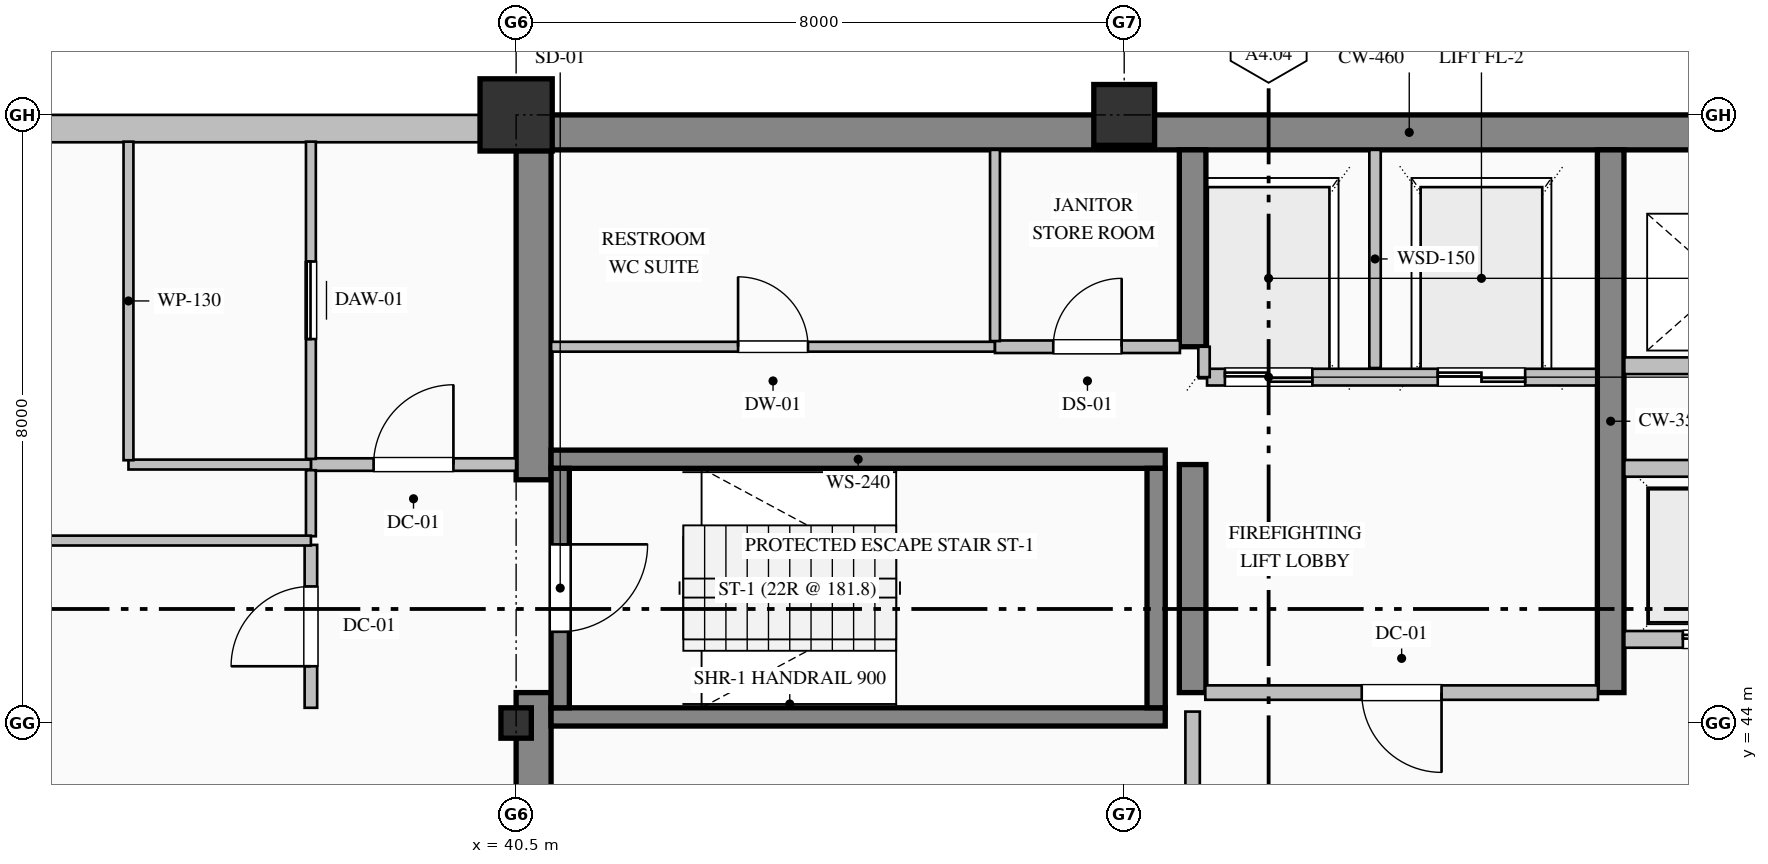
"""IFC4 building model, lengths in metres.
Left out: names, types, materials, properties, quantities, classifications, styles, units other than length and angle.
Written with IfcOpenShell. Run it as: python <this file> out.ifc"""

import sys

from ifc_helpers import new_model, si_unit, direction, frame, frame_2d, origin, origin_2d, place, context, subcontext, project, spatial, rectangle, hollow_rectangle, i_section, extrude, element, fill, save


model = new_model("IFC4")
c1 = context("Model", 3, precision=1e-05, world=origin(), true_north=direction((0.0, 1.0)))
c2 = subcontext(c1, "Body", "Model", "MODEL_VIEW")
j1 = project(units=[si_unit("LENGTHUNIT", "METRE"), si_unit("PLANEANGLEUNIT", "RADIAN")], contexts=[c1])
p1 = place(None, origin())
s1 = spatial("IfcSite", under=j1, at=p1, CompositionType="ELEMENT")
p2 = place(p1, origin())
s2 = spatial("IfcBuilding", under=s1, at=p2, CompositionType="ELEMENT")
p3 = place(p2, frame((0.0, 0.0, 225.8)))
s3 = spatial("IfcBuildingStorey", under=s2, at=p3, CompositionType="ELEMENT", Elevation=225.8)
p4 = place(p3, frame((40.5, 51.77, 0.0), z_axis=(0.0, 0.0, 1.0), x_axis=(1.0, 0.0, 0.0)))
e1 = element("IfcWall", 1, at=p4, inside=s3, PredefinedType="SHEAR", context=c2, shape_type="SweptSolid", body=[
    extrude(rectangle(XDim=23.5, YDim=0.46, at=frame_2d((11.75, 0.0))), origin(), (0.0, 0.0, 1.0), 3.775),
])
p5 = place(p3, frame((40.73, 36.46, 0.0), z_axis=(0.0, 0.0, 1.0), x_axis=(0.0, 1.0, 0.0)))
e2 = element("IfcWall", 2, at=p5, inside=s3, PredefinedType="SHEAR", context=c2, shape_type="SweptSolid", body=[
    extrude(rectangle(XDim=7.94, YDim=0.46, at=frame_2d((3.97, 0.0))), origin(), (0.0, 0.0, 1.0), 3.775),
])
p6 = place(p3, frame((40.73, 47.2, 0.0), z_axis=(0.0, 0.0, 1.0), x_axis=(0.0, 1.0, 0.0)))
e3 = element("IfcWall", 3, at=p6, inside=s3, PredefinedType="SHEAR", context=c2, shape_type="SweptSolid", body=[
    extrude(rectangle(XDim=4.34, YDim=0.46, at=frame_2d((2.17, 0.0))), origin(), (0.0, 0.0, 1.0), 3.775),
])
p7 = place(p3, frame((49.4, 44.4, 0.0), z_axis=(0.0, 0.0, 1.0), x_axis=(0.0, 1.0, 0.0)))
e4 = element("IfcWall", 4, at=p7, inside=s3, PredefinedType="SHEAR", context=c2, shape_type="SweptSolid", body=[
    extrude(rectangle(XDim=3.0, YDim=0.35, at=frame_2d((1.5, 0.0))), origin(), (0.0, 0.0, 1.0), 3.775),
])
p8 = place(p3, frame((49.4, 48.95, 0.0), z_axis=(0.0, 0.0, 1.0), x_axis=(0.0, 1.0, 0.0)))
e5 = element("IfcWall", 5, at=p8, inside=s3, PredefinedType="SHEAR", context=c2, shape_type="SweptSolid", body=[
    extrude(rectangle(XDim=2.59, YDim=0.35, at=frame_2d((1.295, 0.0))), origin(), (0.0, 0.0, 1.0), 3.775),
])
p9 = place(p3, frame((54.9, 44.4, 0.0), z_axis=(0.0, 0.0, 1.0), x_axis=(0.0, 1.0, 0.0)))
e6 = element("IfcWall", 6, at=p9, inside=s3, PredefinedType="SHEAR", context=c2, shape_type="SweptSolid", body=[
    extrude(rectangle(XDim=7.14, YDim=0.35, at=frame_2d((3.57, 0.0))), origin(), (0.0, 0.0, 1.0), 3.775),
])
p10 = place(p3, frame((40.5, 44.0, 0.0), z_axis=(0.0, 0.0, 1.0), x_axis=(1.0, 0.0, 0.0)))
e7 = element("IfcColumn", 7, at=p10, inside=s3, PredefinedType="COLUMN", context=c2, shape_type="SweptSolid", body=[
    extrude(i_section(OverallWidth=0.4, OverallDepth=0.4, WebThickness=0.013, FlangeThickness=0.021, FilletRadius=0.022, at=origin_2d()), origin(), (0.0, 0.0, 1.0), 4.0),
])
p11 = place(p3, frame((40.5, 52.0, 0.0), z_axis=(0.0, 0.0, 1.0), x_axis=(1.0, 0.0, 0.0)))
e8 = element("IfcColumn", 8, at=p11, inside=s3, PredefinedType="COLUMN", context=c2, shape_type="SweptSolid", body=[
    extrude(hollow_rectangle(XDim=0.95, YDim=0.95, WallThickness=0.036, at=origin_2d()), origin(), (0.0, 0.0, 1.0), 4.0),
])
p12 = place(p3, frame((48.5, 52.0, 0.0), z_axis=(0.0, 0.0, 1.0), x_axis=(1.0, 0.0, 0.0)))
e9 = element("IfcColumn", 9, at=p12, inside=s3, PredefinedType="COLUMN", context=c2, shape_type="SweptSolid", body=[
    extrude(hollow_rectangle(XDim=0.8, YDim=0.8, WallThickness=0.032, at=origin_2d()), origin(), (0.0, 0.0, 1.0), 4.0),
])
p13 = place(p3, frame((13.0, 51.82, 0.0), z_axis=(0.0, 0.0, 1.0), x_axis=(1.0, 0.0, 0.0)))
e10 = element("IfcWall", 10, at=p13, inside=s3, PredefinedType="SOLIDWALL", context=c2, shape_type="SweptSolid", body=[
    extrude(rectangle(XDim=27.52, YDim=0.36, at=frame_2d((13.76, 0.0))), origin(), (0.0, 0.0, 1.0), 3.325),
])
p14 = place(p13, frame((6.6, 0.0, 0.9)))
e11 = element("IfcOpeningElement", 11, at=p14, cuts=e10, PredefinedType="OPENING", context=c2, shape_type="SweptSolid", body=[
    extrude(rectangle(XDim=1.2, YDim=1.85, at=frame_2d((0.6, 0.925))), frame((0.0, 0.19, 0.0), z_axis=(0.0, -1.0, 0.0), x_axis=(1.0, 0.0, 0.0)), (0.0, 0.0, 1.0), 0.38),
])
p15 = place(p13, frame((17.4, 0.0, 0.9)))
e12 = element("IfcOpeningElement", 12, at=p15, cuts=e10, PredefinedType="OPENING", context=c2, shape_type="SweptSolid", body=[
    extrude(rectangle(XDim=1.2, YDim=1.85, at=frame_2d((0.6, 0.925))), frame((0.0, 0.19, 0.0), z_axis=(0.0, -1.0, 0.0), x_axis=(1.0, 0.0, 0.0)), (0.0, 0.0, 1.0), 0.38),
])
for number, where, z_axis, x_axis in (
    (13, (40.96, 47.47, 0.0), (0.0, 0.0, 1.0), (1.0, 0.0, 0.0)),
    (14, (49.04, 44.08, 0.0), (0.0, 0.0, 1.0), (-1.0, 0.0, 0.0)),
):
    element("IfcWall", number, at=place(p3, frame(where, z_axis=z_axis, x_axis=x_axis)), inside=s3, PredefinedType="SOLIDWALL", context=c2, shape_type="SweptSolid", body=[
        extrude(rectangle(XDim=8.08, YDim=0.24, at=frame_2d((4.04, 0.0))), origin(), (0.0, 0.0, 1.0), 4.0),
    ])
p16 = place(p3, frame((41.08, 47.35, 0.0), z_axis=(0.0, 0.0, 1.0), x_axis=(0.0, -1.0, 0.0)))
e15 = element("IfcWall", 15, at=p16, inside=s3, PredefinedType="SOLIDWALL", context=c2, shape_type="SweptSolid", body=[
    extrude(rectangle(XDim=3.15, YDim=0.24, at=frame_2d((1.575, 0.0))), origin(), (0.0, 0.0, 1.0), 4.0),
])
p17 = place(p16, frame((1.0, 0.0, 0.0)))
e16 = element("IfcOpeningElement", 16, at=p17, cuts=e15, PredefinedType="OPENING", context=c2, shape_type="SweptSolid", body=[
    extrude(rectangle(XDim=1.15, YDim=2.2, at=frame_2d((0.575, 1.1))), frame((0.0, 0.13, 0.0), z_axis=(0.0, -1.0, 0.0), x_axis=(1.0, 0.0, 0.0)), (0.0, 0.0, 1.0), 0.26),
])
p18 = place(p3, frame((48.92, 44.2, 0.0), z_axis=(0.0, 0.0, 1.0), x_axis=(0.0, 1.0, 0.0)))
e17 = element("IfcWall", 17, at=p18, inside=s3, PredefinedType="SOLIDWALL", context=c2, shape_type="SweptSolid", body=[
    extrude(rectangle(XDim=3.15, YDim=0.24, at=frame_2d((1.575, 0.0))), origin(), (0.0, 0.0, 1.0), 4.0),
])
p19 = place(p3, frame((54.71, 48.55, 0.0), z_axis=(0.0, 0.0, 1.0), x_axis=(-1.0, 0.0, 0.0)))
e18 = element("IfcWall", 18, at=p19, inside=s3, PredefinedType="PARTITIONING", context=c2, shape_type="SweptSolid", body=[
    extrude(rectangle(XDim=5.12, YDim=0.22, at=frame_2d((2.56, 0.0))), origin(), (0.0, 0.0, 1.0), 3.775),
])
p20 = place(p19, frame((3.735, 0.0, 0.0)))
e19 = element("IfcOpeningElement", 19, at=p20, cuts=e18, PredefinedType="OPENING", context=c2, shape_type="SweptSolid", body=[
    extrude(rectangle(XDim=1.15, YDim=2.2, at=frame_2d((0.575, 1.1))), frame((0.0, 0.12, 0.0), z_axis=(0.0, -1.0, 0.0), x_axis=(1.0, 0.0, 0.0)), (0.0, 0.0, 1.0), 0.24),
])
p21 = place(p19, frame((0.935, 0.0, 0.0)))
e20 = element("IfcOpeningElement", 20, at=p21, cuts=e18, PredefinedType="OPENING", context=c2, shape_type="SweptSolid", body=[
    extrude(rectangle(XDim=1.15, YDim=2.2, at=frame_2d((0.575, 1.1))), frame((0.0, 0.12, 0.0), z_axis=(0.0, -1.0, 0.0), x_axis=(1.0, 0.0, 0.0)), (0.0, 0.0, 1.0), 0.24),
])
p22 = place(p3, frame((51.8, 48.67, 0.0), z_axis=(0.0, 0.0, 1.0), x_axis=(0.0, 1.0, 0.0)))
e21 = element("IfcWall", 21, at=p22, inside=s3, PredefinedType="PARTITIONING", context=c2, shape_type="SweptSolid", body=[
    extrude(rectangle(XDim=2.87, YDim=0.15, at=frame_2d((1.435, 0.0))), origin(), (0.0, 0.0, 1.0), 3.775),
])
p23 = place(p3, frame((49.55, 48.55, 0.0), z_axis=(0.0, 0.0, 1.0), x_axis=(0.0, 1.0, 0.0)))
e22 = element("IfcWall", 22, at=p23, inside=s3, PredefinedType="PARTITIONING", context=c2, shape_type="SweptSolid", body=[
    extrude(rectangle(XDim=0.4, YDim=0.15, at=frame_2d((0.2, 0.0))), origin(), (0.0, 0.0, 1.0), 3.775),
])
p24 = place(p3, frame((63.32, 45.1, 0.0), z_axis=(0.0, 0.0, 1.0), x_axis=(-1.0, 0.0, 0.0)))
e23 = element("IfcWall", 23, at=p24, inside=s3, PredefinedType="PARTITIONING", context=c2, shape_type="SweptSolid", body=[
    extrude(rectangle(XDim=8.24, YDim=0.22, at=frame_2d((4.12, 0.0))), origin(), (0.0, 0.0, 1.0), 3.775),
])
p25 = place(p24, frame((6.37, 0.0, 0.0)))
e24 = element("IfcOpeningElement", 24, at=p25, cuts=e23, PredefinedType="OPENING", context=c2, shape_type="SweptSolid", body=[
    extrude(rectangle(XDim=1.1, YDim=2.2, at=frame_2d((0.55, 1.1))), frame((0.0, 0.12, 0.0), z_axis=(0.0, -1.0, 0.0), x_axis=(1.0, 0.0, 0.0)), (0.0, 0.0, 1.0), 0.24),
])
p26 = place(p24, frame((3.57, 0.0, 0.0)))
e25 = element("IfcOpeningElement", 25, at=p26, cuts=e23, PredefinedType="OPENING", context=c2, shape_type="SweptSolid", body=[
    extrude(rectangle(XDim=1.1, YDim=2.2, at=frame_2d((0.55, 1.1))), frame((0.0, 0.12, 0.0), z_axis=(0.0, -1.0, 0.0), x_axis=(1.0, 0.0, 0.0)), (0.0, 0.0, 1.0), 0.24),
])
p27 = place(p24, frame((0.77, 0.0, 0.0)))
e26 = element("IfcOpeningElement", 26, at=p27, cuts=e23, PredefinedType="OPENING", context=c2, shape_type="SweptSolid", body=[
    extrude(rectangle(XDim=1.1, YDim=2.2, at=frame_2d((0.55, 1.1))), frame((0.0, 0.12, 0.0), z_axis=(0.0, -1.0, 0.0), x_axis=(1.0, 0.0, 0.0)), (0.0, 0.0, 1.0), 0.24),
])
for number, where, z_axis, x_axis in (
    (27, (55.08, 47.35, 0.0), (0.0, 0.0, 1.0), (1.0, 0.0, 0.0)),
    (28, (63.32, 48.7, 0.0), (0.0, 0.0, 1.0), (-1.0, 0.0, 0.0)),
):
    element("IfcWall", number, at=place(p3, frame(where, z_axis=z_axis, x_axis=x_axis)), inside=s3, PredefinedType="PARTITIONING", context=c2, shape_type="SweptSolid", body=[
        extrude(rectangle(XDim=8.24, YDim=0.22, at=frame_2d((4.12, 0.0))), origin(), (0.0, 0.0, 1.0), 3.775),
    ])
p28 = place(p3, frame((37.8, 47.4, 0.0), z_axis=(0.0, 0.0, 1.0), x_axis=(1.0, 0.0, 0.0)))
e29 = element("IfcWall", 29, at=p28, inside=s3, PredefinedType="PARTITIONING", context=c2, shape_type="SweptSolid", body=[
    extrude(rectangle(XDim=2.7, YDim=0.165, at=frame_2d((1.35, 0.0))), origin(), (0.0, 0.0, 1.0), 3.775),
])
p29 = place(p28, frame((0.825, 0.0, 0.0)))
e30 = element("IfcOpeningElement", 30, at=p29, cuts=e29, PredefinedType="OPENING", context=c2, shape_type="SweptSolid", body=[
    extrude(rectangle(XDim=1.05, YDim=2.15, at=frame_2d((0.525, 1.075))), frame((0.0, 0.093, 0.0), z_axis=(0.0, -1.0, 0.0), x_axis=(1.0, 0.0, 0.0)), (0.0, 0.0, 1.0), 0.185),
])
p30 = place(p3, frame((37.8, 44.2, 0.0), z_axis=(0.0, 0.0, 1.0), x_axis=(0.0, 1.0, 0.0)))
e31 = element("IfcWall", 31, at=p30, inside=s3, PredefinedType="PARTITIONING", context=c2, shape_type="SweptSolid", body=[
    extrude(rectangle(XDim=2.143, YDim=0.165, at=frame_2d((1.072, 0.0))), origin(), (0.0, 0.0, 1.0), 3.775),
])
p31 = place(p30, frame((0.546, 0.0, 0.0)))
e32 = element("IfcOpeningElement", 32, at=p31, cuts=e31, PredefinedType="OPENING", context=c2, shape_type="SweptSolid", body=[
    extrude(rectangle(XDim=1.05, YDim=2.15, at=frame_2d((0.525, 1.075))), frame((0.0, 0.093, 0.0), z_axis=(0.0, -1.0, 0.0), x_axis=(1.0, 0.0, 0.0)), (0.0, 0.0, 1.0), 0.185),
])
p32 = place(p3, frame((37.8, 46.457, 0.0), z_axis=(0.0, 0.0, 1.0), x_axis=(0.0, 1.0, 0.0)))
e33 = element("IfcWall", 33, at=p32, inside=s3, PredefinedType="PARTITIONING", context=c2, shape_type="SweptSolid", body=[
    extrude(rectangle(XDim=0.868, YDim=0.13, at=frame_2d((0.434, 0.0))), origin(), (0.0, 0.0, 1.0), 3.775),
])
p33 = place(p3, frame((37.8, 47.475, 0.0), z_axis=(0.0, 0.0, 1.0), x_axis=(0.0, 1.0, 0.0)))
e34 = element("IfcWall", 34, at=p33, inside=s3, PredefinedType="PARTITIONING", context=c2, shape_type="SweptSolid", body=[
    extrude(rectangle(XDim=4.173, YDim=0.13, at=frame_2d((2.087, 0.0))), origin(), (0.0, 0.0, 1.0), 3.775),
])
p34 = place(p33, frame((1.577, 0.0, 0.0)))
e35 = element("IfcOpeningElement", 35, at=p34, cuts=e34, PredefinedType="OPENING", context=c2, shape_type="SweptSolid", body=[
    extrude(rectangle(XDim=1.02, YDim=2.15, at=frame_2d((0.51, 1.075))), frame((0.0, 0.075, 0.0), z_axis=(0.0, -1.0, 0.0), x_axis=(1.0, 0.0, 0.0)), (0.0, 0.0, 1.0), 0.15),
])
p35 = place(p3, frame((37.8, 47.4, 0.0), z_axis=(0.0, 0.0, 1.0), x_axis=(-1.0, 0.0, 0.0)))
e36 = element("IfcWall", 36, at=p35, inside=s3, PredefinedType="PARTITIONING", context=c2, shape_type="SweptSolid", body=[
    extrude(rectangle(XDim=2.4, YDim=0.13, at=frame_2d((1.2, 0.0))), origin(), (0.0, 0.0, 1.0), 3.775),
])
p36 = place(p3, frame((35.4, 47.457, 0.0), z_axis=(0.0, 0.0, 1.0), x_axis=(0.0, 1.0, 0.0)))
e37 = element("IfcWall", 37, at=p36, inside=s3, PredefinedType="PARTITIONING", context=c2, shape_type="SweptSolid", body=[
    extrude(rectangle(XDim=4.191, YDim=0.13, at=frame_2d((2.095, 0.0))), origin(), (0.0, 0.0, 1.0), 3.775),
])
p37 = place(p3, frame((40.96, 48.95, 0.0), z_axis=(0.0, 0.0, 1.0), x_axis=(1.0, 0.0, 0.0)))
e38 = element("IfcWall", 38, at=p37, inside=s3, PredefinedType="PARTITIONING", context=c2, shape_type="SweptSolid", body=[
    extrude(rectangle(XDim=5.84, YDim=0.13, at=frame_2d((2.92, 0.0))), origin(), (0.0, 0.0, 1.0), 3.775),
])
p38 = place(p37, frame((2.46, 0.0, 0.0)))
e39 = element("IfcOpeningElement", 39, at=p38, cuts=e38, PredefinedType="OPENING", context=c2, shape_type="SweptSolid", body=[
    extrude(rectangle(XDim=0.92, YDim=2.15, at=frame_2d((0.46, 1.075))), frame((0.0, 0.075, 0.0), z_axis=(0.0, -1.0, 0.0), x_axis=(1.0, 0.0, 0.0)), (0.0, 0.0, 1.0), 0.15),
])
p39 = place(p3, frame((46.8, 48.95, 0.0), z_axis=(0.0, 0.0, 1.0), x_axis=(1.0, 0.0, 0.0)))
e40 = element("IfcWall", 40, at=p39, inside=s3, PredefinedType="PARTITIONING", context=c2, shape_type="SweptSolid", body=[
    extrude(rectangle(XDim=2.433, YDim=0.165, at=frame_2d((1.216, 0.0))), origin(), (0.0, 0.0, 1.0), 3.775),
])
p40 = place(p39, frame((0.767, 0.0, 0.0)))
e41 = element("IfcOpeningElement", 41, at=p40, cuts=e40, PredefinedType="OPENING", context=c2, shape_type="SweptSolid", body=[
    extrude(rectangle(XDim=0.9, YDim=2.15, at=frame_2d((0.45, 1.075))), frame((0.0, 0.093, 0.0), z_axis=(0.0, -1.0, 0.0), x_axis=(1.0, 0.0, 0.0)), (0.0, 0.0, 1.0), 0.185),
])
p41 = place(p3, frame((54.733, 44.4, 0.0), z_axis=(0.0, 0.0, 1.0), x_axis=(-1.0, 0.0, 0.0)))
e42 = element("IfcWall", 42, at=p41, inside=s3, PredefinedType="PARTITIONING", context=c2, shape_type="SweptSolid", body=[
    extrude(rectangle(XDim=5.166, YDim=0.19, at=frame_2d((2.583, 0.0))), origin(), (0.0, 0.0, 1.0), 3.775),
])
p42 = place(p41, frame((2.058, 0.0, 0.0)))
e43 = element("IfcOpeningElement", 43, at=p42, cuts=e42, PredefinedType="OPENING", context=c2, shape_type="SweptSolid", body=[
    extrude(rectangle(XDim=1.05, YDim=2.15, at=frame_2d((0.525, 1.075))), frame((0.0, 0.105, 0.0), z_axis=(0.0, -1.0, 0.0), x_axis=(1.0, 0.0, 0.0)), (0.0, 0.0, 1.0), 0.21),
])
p43 = place(p3, frame((49.4, 40.487, 0.0), z_axis=(0.0, 0.0, 1.0), x_axis=(0.0, 1.0, 0.0)))
e44 = element("IfcWall", 44, at=p43, inside=s3, PredefinedType="PARTITIONING", context=c2, shape_type="SweptSolid", body=[
    extrude(rectangle(XDim=3.663, YDim=0.19, at=frame_2d((1.832, 0.0))), origin(), (0.0, 0.0, 1.0), 3.017),
])
p44 = place(p43, frame((1.132, 0.0, 0.0)))
e45 = element("IfcOpeningElement", 45, at=p44, cuts=e44, PredefinedType="OPENING", context=c2, shape_type="SweptSolid", body=[
    extrude(rectangle(XDim=1.4, YDim=2.25, at=frame_2d((0.7, 1.125))), frame((0.0, 0.105, 0.0), z_axis=(0.0, -1.0, 0.0), x_axis=(1.0, 0.0, 0.0)), (0.0, 0.0, 1.0), 0.21),
])
p45 = place(p3, frame((46.8, 51.54, 0.0), z_axis=(0.0, 0.0, 1.0), x_axis=(0.0, -1.0, 0.0)))
e46 = element("IfcWall", 46, at=p45, inside=s3, PredefinedType="PARTITIONING", context=c2, shape_type="SweptSolid", body=[
    extrude(rectangle(XDim=2.516, YDim=0.13, at=frame_2d((1.258, 0.0))), origin(), (0.0, 0.0, 1.0), 3.775),
])
p46 = place(p3, frame((29.6, 46.4, 0.0), z_axis=(0.0, 0.0, 1.0), x_axis=(1.0, 0.0, 0.0)))
e47 = element("IfcWall", 47, at=p46, inside=s3, PredefinedType="PARTITIONING", context=c2, shape_type="SweptSolid", body=[
    extrude(rectangle(XDim=8.2, YDim=0.13, at=frame_2d((4.1, 0.0))), origin(), (0.0, 0.0, 1.0), 3.775),
])
p47 = place(p46, frame((3.6, 0.0, 0.0)))
e48 = element("IfcOpeningElement", 48, at=p47, cuts=e47, PredefinedType="OPENING", context=c2, shape_type="SweptSolid", body=[
    extrude(rectangle(XDim=1.0, YDim=2.15, at=frame_2d((0.5, 1.075))), frame((0.0, 0.075, 0.0), z_axis=(0.0, -1.0, 0.0), x_axis=(1.0, 0.0, 0.0)), (0.0, 0.0, 1.0), 0.15),
])
p48 = place(p17, origin())
e49 = element("IfcDoor", 49, at=p48, inside=s3, OperationType="SINGLE_SWING_LEFT", PredefinedType="DOOR", context=c2, shape_type="SweptSolid", body=[
    extrude(rectangle(XDim=1.15, YDim=2.2, at=frame_2d((0.575, 1.1))), frame((0.0, 0.025, 0.0), z_axis=(0.0, -1.0, 0.0), x_axis=(1.0, 0.0, 0.0)), (0.0, 0.0, 1.0), 0.05),
])
fill(e16, e49)
p49 = place(p20, origin())
e50 = element("IfcDoor", 50, at=p49, inside=s3, OperationType="DOUBLE_DOOR_SLIDING", PredefinedType="DOOR", context=c2, shape_type="SweptSolid", body=[
    extrude(rectangle(XDim=1.15, YDim=2.2, at=frame_2d((0.575, 1.1))), frame((0.0, 0.025, 0.0), z_axis=(0.0, -1.0, 0.0), x_axis=(1.0, 0.0, 0.0)), (0.0, 0.0, 1.0), 0.05),
])
fill(e19, e50)
p50 = place(p21, origin())
e51 = element("IfcDoor", 51, at=p50, inside=s3, OperationType="DOUBLE_DOOR_SLIDING", PredefinedType="DOOR", context=c2, shape_type="SweptSolid", body=[
    extrude(rectangle(XDim=1.15, YDim=2.2, at=frame_2d((0.575, 1.1))), frame((0.0, 0.025, 0.0), z_axis=(0.0, -1.0, 0.0), x_axis=(1.0, 0.0, 0.0)), (0.0, 0.0, 1.0), 0.05),
])
fill(e20, e51)
p51 = place(p25, origin())
e52 = element("IfcDoor", 52, at=p51, inside=s3, OperationType="DOUBLE_DOOR_SLIDING", PredefinedType="DOOR", context=c2, shape_type="SweptSolid", body=[
    extrude(rectangle(XDim=1.1, YDim=2.2, at=frame_2d((0.55, 1.1))), frame((0.0, 0.025, 0.0), z_axis=(0.0, -1.0, 0.0), x_axis=(1.0, 0.0, 0.0)), (0.0, 0.0, 1.0), 0.05),
])
fill(e24, e52)
p52 = place(p42, origin())
e53 = element("IfcDoor", 53, at=p52, inside=s3, OperationType="SINGLE_SWING_LEFT", PredefinedType="DOOR", context=c2, shape_type="SweptSolid", body=[
    extrude(rectangle(XDim=1.05, YDim=2.15, at=frame_2d((0.525, 1.075))), frame((0.0, 0.025, 0.0), z_axis=(0.0, -1.0, 0.0), x_axis=(1.0, 0.0, 0.0)), (0.0, 0.0, 1.0), 0.05),
])
fill(e43, e53)
p53 = place(p29, origin())
e54 = element("IfcDoor", 54, at=p53, inside=s3, OperationType="SINGLE_SWING_RIGHT", PredefinedType="DOOR", context=c2, shape_type="SweptSolid", body=[
    extrude(rectangle(XDim=1.05, YDim=2.15, at=frame_2d((0.525, 1.075))), frame((0.0, 0.025, 0.0), z_axis=(0.0, -1.0, 0.0), x_axis=(1.0, 0.0, 0.0)), (0.0, 0.0, 1.0), 0.05),
])
fill(e30, e54)
p54 = place(p31, origin())
e55 = element("IfcDoor", 55, at=p54, inside=s3, OperationType="SINGLE_SWING_LEFT", PredefinedType="DOOR", context=c2, shape_type="SweptSolid", body=[
    extrude(rectangle(XDim=1.05, YDim=2.15, at=frame_2d((0.525, 1.075))), frame((0.0, 0.025, 0.0), z_axis=(0.0, -1.0, 0.0), x_axis=(1.0, 0.0, 0.0)), (0.0, 0.0, 1.0), 0.05),
])
fill(e32, e55)
p55 = place(p34, origin())
e56 = element("IfcDoor", 56, at=p55, inside=s3, OperationType="SLIDING_TO_LEFT", PredefinedType="DOOR", context=c2, shape_type="SweptSolid", body=[
    extrude(rectangle(XDim=1.02, YDim=2.15, at=frame_2d((0.51, 1.075))), frame((0.0, 0.025, 0.0), z_axis=(0.0, -1.0, 0.0), x_axis=(1.0, 0.0, 0.0)), (0.0, 0.0, 1.0), 0.05),
])
fill(e35, e56)
p56 = place(p38, origin())
e57 = element("IfcDoor", 57, at=p56, inside=s3, OperationType="SINGLE_SWING_LEFT", PredefinedType="DOOR", context=c2, shape_type="SweptSolid", body=[
    extrude(rectangle(XDim=0.92, YDim=2.15, at=frame_2d((0.46, 1.075))), frame((0.0, 0.025, 0.0), z_axis=(0.0, -1.0, 0.0), x_axis=(1.0, 0.0, 0.0)), (0.0, 0.0, 1.0), 0.05),
])
fill(e39, e57)
p57 = place(p40, origin())
e58 = element("IfcDoor", 58, at=p57, inside=s3, OperationType="SINGLE_SWING_RIGHT", PredefinedType="DOOR", context=c2, shape_type="SweptSolid", body=[
    extrude(rectangle(XDim=0.9, YDim=2.15, at=frame_2d((0.45, 1.075))), frame((0.0, 0.025, 0.0), z_axis=(0.0, -1.0, 0.0), x_axis=(1.0, 0.0, 0.0)), (0.0, 0.0, 1.0), 0.05),
])
fill(e41, e58)
save(model, sys.argv[1])
